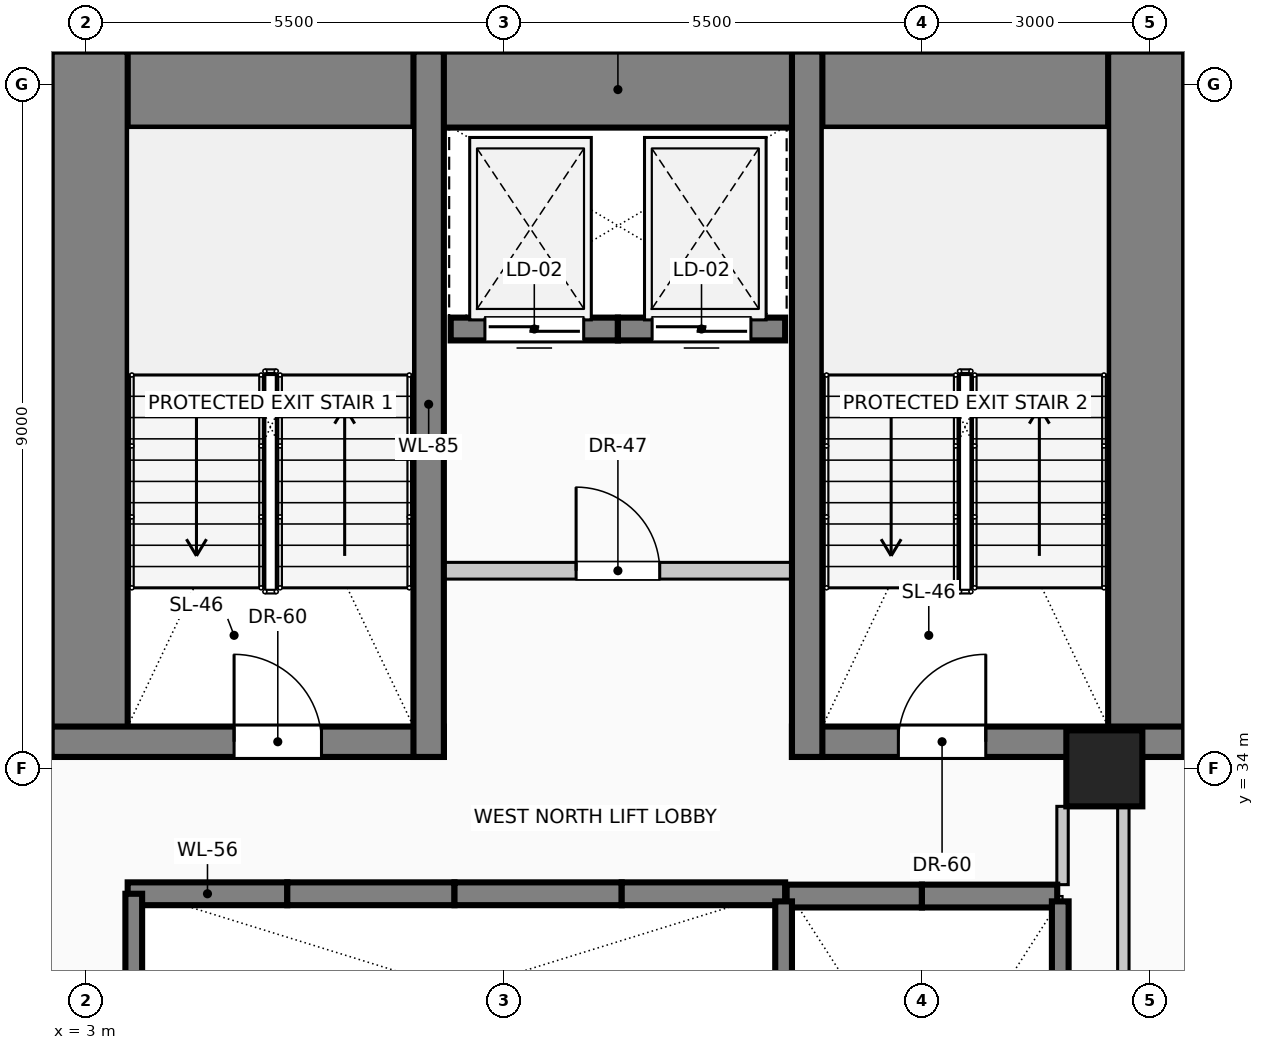
"""IFC4 building model, lengths in metres.
Left out: names, types, materials, properties, quantities, classifications, styles, units other than length and angle.
Written with IfcOpenShell. Run it as: python <this file> out.ifc"""

import sys

from ifc_helpers import new_model, si_unit, direction, frame, frame_2d, origin, origin_2d, place, context, subcontext, project, spatial, rectangle, circle, extrude, element, fill, save


model = new_model("IFC4")
c1 = context("Model", 3, precision=1e-05, world=origin(), true_north=direction((0.0, 1.0)))
c2 = subcontext(c1, "Body", "Model", "MODEL_VIEW")
j1 = project(units=[si_unit("LENGTHUNIT", "METRE"), si_unit("PLANEANGLEUNIT", "RADIAN")], contexts=[c1])
p1 = place(None, origin())
s1 = spatial("IfcSite", under=j1, at=p1, CompositionType="ELEMENT")
p2 = place(p1, origin())
s2 = spatial("IfcBuilding", under=s1, at=p2, CompositionType="ELEMENT")
p3 = place(p2, frame((0.0, 0.0, 74.6)))
s3 = spatial("IfcBuildingStorey", under=s2, at=p3, CompositionType="ELEMENT", Elevation=74.6)
p4 = place(p3, frame((2.55, 42.93, 0.0), z_axis=(0.0, 0.0, 1.0), x_axis=(1.0, 0.0, 0.0)))
e1 = element("IfcWall", 1, at=p4, inside=s3, PredefinedType="SHEAR", context=c2, shape_type="SweptSolid", body=[
    extrude(rectangle(XDim=14.9, YDim=1.0, at=frame_2d((7.45, 0.0))), origin(), (0.0, 0.0, 1.0), 4.0),
])
for number, where, z_axis, x_axis in (
    (2, (3.05, 34.15, 0.0), (0.0, 0.0, 1.0), (0.0, 1.0, 0.0)),
    (3, (16.95, 34.15, 0.0), (0.0, 0.0, 1.0), (0.0, 1.0, 0.0)),
):
    element("IfcWall", number, at=place(p3, frame(where, z_axis=z_axis, x_axis=x_axis)), inside=s3, PredefinedType="SHEAR", context=c2, shape_type="SweptSolid", body=[
        extrude(rectangle(XDim=9.28, YDim=1.0, at=frame_2d((4.64, 0.0))), origin(), (0.0, 0.0, 1.0), 4.0),
    ])
p5 = place(p3, frame((2.55, 34.35, 0.0), z_axis=(0.0, 0.0, 1.0), x_axis=(1.0, 0.0, 0.0)))
e4 = element("IfcWall", 4, at=p5, inside=s3, PredefinedType="SHEAR", context=c2, shape_type="SweptSolid", body=[
    extrude(rectangle(XDim=5.16, YDim=0.4, at=frame_2d((2.58, 0.0))), origin(), (0.0, 0.0, 1.0), 4.0),
])
p6 = place(p5, frame((2.4, 0.0, 0.0)))
e5 = element("IfcOpeningElement", 5, at=p6, cuts=e4, PredefinedType="OPENING", context=c2, shape_type="SweptSolid", body=[
    extrude(rectangle(XDim=1.15, YDim=2.2, at=frame_2d((0.575, 1.1))), frame((0.0, 0.21, 0.0), z_axis=(0.0, -1.0, 0.0), x_axis=(1.0, 0.0, 0.0)), (0.0, 0.0, 1.0), 0.42),
])
p7 = place(p3, frame((12.29, 34.35, 0.0), z_axis=(0.0, 0.0, 1.0), x_axis=(1.0, 0.0, 0.0)))
e6 = element("IfcWall", 6, at=p7, inside=s3, PredefinedType="SHEAR", context=c2, shape_type="SweptSolid", body=[
    extrude(rectangle(XDim=5.16, YDim=0.4, at=frame_2d((2.58, 0.0))), origin(), (0.0, 0.0, 1.0), 4.0),
])
p8 = place(p7, frame((1.4, 0.0, 0.0)))
e7 = element("IfcOpeningElement", 7, at=p8, cuts=e6, PredefinedType="OPENING", context=c2, shape_type="SweptSolid", body=[
    extrude(rectangle(XDim=1.15, YDim=2.2, at=frame_2d((0.575, 1.1))), frame((0.0, 0.21, 0.0), z_axis=(0.0, -1.0, 0.0), x_axis=(1.0, 0.0, 0.0)), (0.0, 0.0, 1.0), 0.42),
])
for number, where, z_axis, x_axis in (
    (8, (7.51, 34.15, 0.0), (0.0, 0.0, 1.0), (0.0, 1.0, 0.0)),
    (9, (12.49, 34.15, 0.0), (0.0, 0.0, 1.0), (0.0, 1.0, 0.0)),
):
    element("IfcWall", number, at=place(p3, frame(where, z_axis=z_axis, x_axis=x_axis)), inside=s3, PredefinedType="SHEAR", context=c2, shape_type="SweptSolid", body=[
        extrude(rectangle(XDim=9.28, YDim=0.4, at=frame_2d((4.64, 0.0))), origin(), (0.0, 0.0, 1.0), 4.0),
    ])
p9 = place(p3, frame((16.4, 34.0, 0.0), z_axis=(0.0, 0.0, 1.0), x_axis=(1.0, 0.0, 0.0)))
e10 = element("IfcColumn", 10, at=p9, inside=s3, PredefinedType="COLUMN", context=c2, shape_type="SweptSolid", body=[
    extrude(circle(Radius=0.5, at=origin_2d()), origin(), (0.0, 0.0, 1.0), 4.0),
])
for number, where, z_axis, x_axis in (
    (11, (12.22, 32.32, 0.0), (0.0, 0.0, 1.0), (1.0, 0.0, 0.0)),
    (12, (14.0, 32.32, 0.0), (0.0, 0.0, 1.0), (1.0, 0.0, 0.0)),
):
    element("IfcWall", number, at=place(p3, frame(where, z_axis=z_axis, x_axis=x_axis)), inside=s3, PredefinedType="SOLIDWALL", context=c2, shape_type="SweptSolid", body=[
        extrude(rectangle(XDim=1.78, YDim=0.3, at=frame_2d((0.89, 0.0))), origin(), (0.0, 0.0, 1.0), 4.0),
    ])
p10 = place(p3, frame((3.55, 32.35, 0.0), z_axis=(0.0, 0.0, 1.0), x_axis=(1.0, 0.0, 0.0)))
e13 = element("IfcWall", 13, at=p10, inside=s3, PredefinedType="SOLIDWALL", context=c2, shape_type="SweptSolid", body=[
    extrude(rectangle(XDim=2.1, YDim=0.3, at=frame_2d((1.05, 0.0))), origin(), (0.0, 0.0, 1.0), 4.0),
])
p11 = place(p3, frame((5.65, 32.35, 0.0), z_axis=(0.0, 0.0, 1.0), x_axis=(1.0, 0.0, 0.0)))
e14 = element("IfcWall", 14, at=p11, inside=s3, PredefinedType="SOLIDWALL", context=c2, shape_type="SweptSolid", body=[
    extrude(rectangle(XDim=2.2, YDim=0.3, at=frame_2d((1.1, 0.0))), origin(), (0.0, 0.0, 1.0), 4.0),
])
p12 = place(p3, frame((7.85, 32.35, 0.0), z_axis=(0.0, 0.0, 1.0), x_axis=(1.0, 0.0, 0.0)))
e15 = element("IfcWall", 15, at=p12, inside=s3, PredefinedType="SOLIDWALL", context=c2, shape_type="SweptSolid", body=[
    extrude(rectangle(XDim=2.2, YDim=0.3, at=frame_2d((1.1, 0.0))), origin(), (0.0, 0.0, 1.0), 4.0),
])
p13 = place(p3, frame((10.05, 32.35, 0.0), z_axis=(0.0, 0.0, 1.0), x_axis=(1.0, 0.0, 0.0)))
e16 = element("IfcWall", 16, at=p13, inside=s3, PredefinedType="SOLIDWALL", context=c2, shape_type="SweptSolid", body=[
    extrude(rectangle(XDim=2.15, YDim=0.3, at=frame_2d((1.075, 0.0))), origin(), (0.0, 0.0, 1.0), 4.0),
])
p14 = place(p3, frame((10.0, 39.78, 0.0), z_axis=(0.0, 0.0, 1.0), x_axis=(-1.0, 0.0, 0.0)))
e17 = element("IfcWall", 17, at=p14, inside=s3, PredefinedType="SOLIDWALL", context=c2, shape_type="SweptSolid", body=[
    extrude(rectangle(XDim=2.2, YDim=0.3, at=frame_2d((1.1, 0.0))), origin(), (0.0, 0.0, 1.0), 4.0),
])
p15 = place(p14, frame((0.45, 0.0, 0.0)))
e18 = element("IfcOpeningElement", 18, at=p15, cuts=e17, PredefinedType="OPENING", context=c2, shape_type="SweptSolid", body=[
    extrude(rectangle(XDim=1.3, YDim=2.25, at=frame_2d((0.65, 1.125))), frame((0.0, 0.16, 0.0), z_axis=(0.0, -1.0, 0.0), x_axis=(1.0, 0.0, 0.0)), (0.0, 0.0, 1.0), 0.32),
])
p16 = place(p3, frame((12.2, 39.78, 0.0), z_axis=(0.0, 0.0, 1.0), x_axis=(-1.0, 0.0, 0.0)))
e19 = element("IfcWall", 19, at=p16, inside=s3, PredefinedType="SOLIDWALL", context=c2, shape_type="SweptSolid", body=[
    extrude(rectangle(XDim=2.2, YDim=0.3, at=frame_2d((1.1, 0.0))), origin(), (0.0, 0.0, 1.0), 4.0),
])
p17 = place(p16, frame((0.45, 0.0, 0.0)))
e20 = element("IfcOpeningElement", 20, at=p17, cuts=e19, PredefinedType="OPENING", context=c2, shape_type="SweptSolid", body=[
    extrude(rectangle(XDim=1.3, YDim=2.25, at=frame_2d((0.65, 1.125))), frame((0.0, 0.16, 0.0), z_axis=(0.0, -1.0, 0.0), x_axis=(1.0, 0.0, 0.0)), (0.0, 0.0, 1.0), 0.32),
])
p18 = place(p3, frame((3.63, 26.8, 0.0), z_axis=(0.0, 0.0, 1.0), x_axis=(0.0, 1.0, 0.0)))
e21 = element("IfcWall", 21, at=p18, inside=s3, PredefinedType="SOLIDWALL", context=c2, shape_type="SweptSolid", body=[
    extrude(rectangle(XDim=5.55, YDim=0.22, at=frame_2d((2.775, 0.0))), origin(), (0.0, 0.0, 1.0), 4.0),
])
for number, where, z_axis, x_axis in (
    (22, (12.18, 26.8, 0.0), (0.0, 0.0, 1.0), (0.0, 1.0, 0.0)),
    (23, (15.82, 26.8, 0.0), (0.0, 0.0, 1.0), (0.0, 1.0, 0.0)),
):
    element("IfcWall", number, at=place(p3, frame(where, z_axis=z_axis, x_axis=x_axis)), inside=s3, PredefinedType="SOLIDWALL", context=c2, shape_type="SweptSolid", body=[
        extrude(rectangle(XDim=5.45, YDim=0.22, at=frame_2d((2.725, 0.0))), origin(), (0.0, 0.0, 1.0), 4.0),
    ])
p19 = place(p3, frame((7.51, 36.6, 0.0), z_axis=(0.0, 0.0, 1.0), x_axis=(1.0, 0.0, 0.0)))
e24 = element("IfcWall", 24, at=p19, inside=s3, PredefinedType="PARTITIONING", context=c2, shape_type="SweptSolid", body=[
    extrude(rectangle(XDim=4.98, YDim=0.22, at=frame_2d((2.49, 0.0))), origin(), (0.0, 0.0, 1.0), 3.7),
])
p20 = place(p19, frame((1.94, 0.0, 0.0)))
e25 = element("IfcOpeningElement", 25, at=p20, cuts=e24, PredefinedType="OPENING", context=c2, shape_type="SweptSolid", body=[
    extrude(rectangle(XDim=1.1, YDim=2.2, at=frame_2d((0.55, 1.1))), frame((0.0, 0.12, 0.0), z_axis=(0.0, -1.0, 0.0), x_axis=(1.0, 0.0, 0.0)), (0.0, 0.0, 1.0), 0.24),
])
p21 = place(p3, frame((15.85, 32.47, 0.0), z_axis=(0.0, 0.0, 1.0), x_axis=(0.0, 1.0, 0.0)))
e26 = element("IfcWall", 26, at=p21, inside=s3, PredefinedType="PARTITIONING", context=c2, shape_type="SweptSolid", body=[
    extrude(rectangle(XDim=1.03, YDim=0.15, at=frame_2d((0.515, 0.0))), origin(), (0.0, 0.0, 1.0), 3.7),
])
p22 = place(p3, frame((16.65, 28.275, 0.0), z_axis=(0.0, 0.0, 1.0), x_axis=(0.0, 1.0, 0.0)))
e27 = element("IfcWall", 27, at=p22, inside=s3, PredefinedType="PARTITIONING", context=c2, shape_type="SweptSolid", body=[
    extrude(rectangle(XDim=5.225, YDim=0.15, at=frame_2d((2.613, 0.0))), origin(), (0.0, 0.0, 1.0), 2.995),
])
p23 = place(p15, origin())
e28 = element("IfcDoor", 28, at=p23, inside=s3, OperationType="SLIDING_TO_LEFT", PredefinedType="DOOR", context=c2, shape_type="SweptSolid", body=[
    extrude(rectangle(XDim=1.3, YDim=2.25, at=frame_2d((0.65, 1.125))), frame((0.0, 0.025, 0.0), z_axis=(0.0, -1.0, 0.0), x_axis=(1.0, 0.0, 0.0)), (0.0, 0.0, 1.0), 0.05),
])
fill(e18, e28)
p24 = place(p17, origin())
e29 = element("IfcDoor", 29, at=p24, inside=s3, OperationType="SLIDING_TO_RIGHT", PredefinedType="DOOR", context=c2, shape_type="SweptSolid", body=[
    extrude(rectangle(XDim=1.3, YDim=2.25, at=frame_2d((0.65, 1.125))), frame((0.0, 0.025, 0.0), z_axis=(0.0, -1.0, 0.0), x_axis=(1.0, 0.0, 0.0)), (0.0, 0.0, 1.0), 0.05),
])
fill(e20, e29)
p25 = place(p6, origin())
e30 = element("IfcDoor", 30, at=p25, inside=s3, OperationType="SINGLE_SWING_LEFT", PredefinedType="DOOR", context=c2, shape_type="SweptSolid", body=[
    extrude(rectangle(XDim=1.15, YDim=2.2, at=frame_2d((0.575, 1.1))), frame((0.0, 0.025, 0.0), z_axis=(0.0, -1.0, 0.0), x_axis=(1.0, 0.0, 0.0)), (0.0, 0.0, 1.0), 0.05),
])
fill(e5, e30)
p26 = place(p8, origin())
e31 = element("IfcDoor", 31, at=p26, inside=s3, OperationType="SINGLE_SWING_RIGHT", PredefinedType="DOOR", context=c2, shape_type="SweptSolid", body=[
    extrude(rectangle(XDim=1.15, YDim=2.2, at=frame_2d((0.575, 1.1))), frame((0.0, 0.025, 0.0), z_axis=(0.0, -1.0, 0.0), x_axis=(1.0, 0.0, 0.0)), (0.0, 0.0, 1.0), 0.05),
])
fill(e7, e31)
p27 = place(p20, origin())
e32 = element("IfcDoor", 32, at=p27, inside=s3, OperationType="SINGLE_SWING_LEFT", PredefinedType="DOOR", context=c2, shape_type="SweptSolid", body=[
    extrude(rectangle(XDim=1.1, YDim=2.2, at=frame_2d((0.55, 1.1))), frame((0.0, 0.025, 0.0), z_axis=(0.0, -1.0, 0.0), x_axis=(1.0, 0.0, 0.0)), (0.0, 0.0, 1.0), 0.05),
])
fill(e25, e32)
save(model, sys.argv[1])
